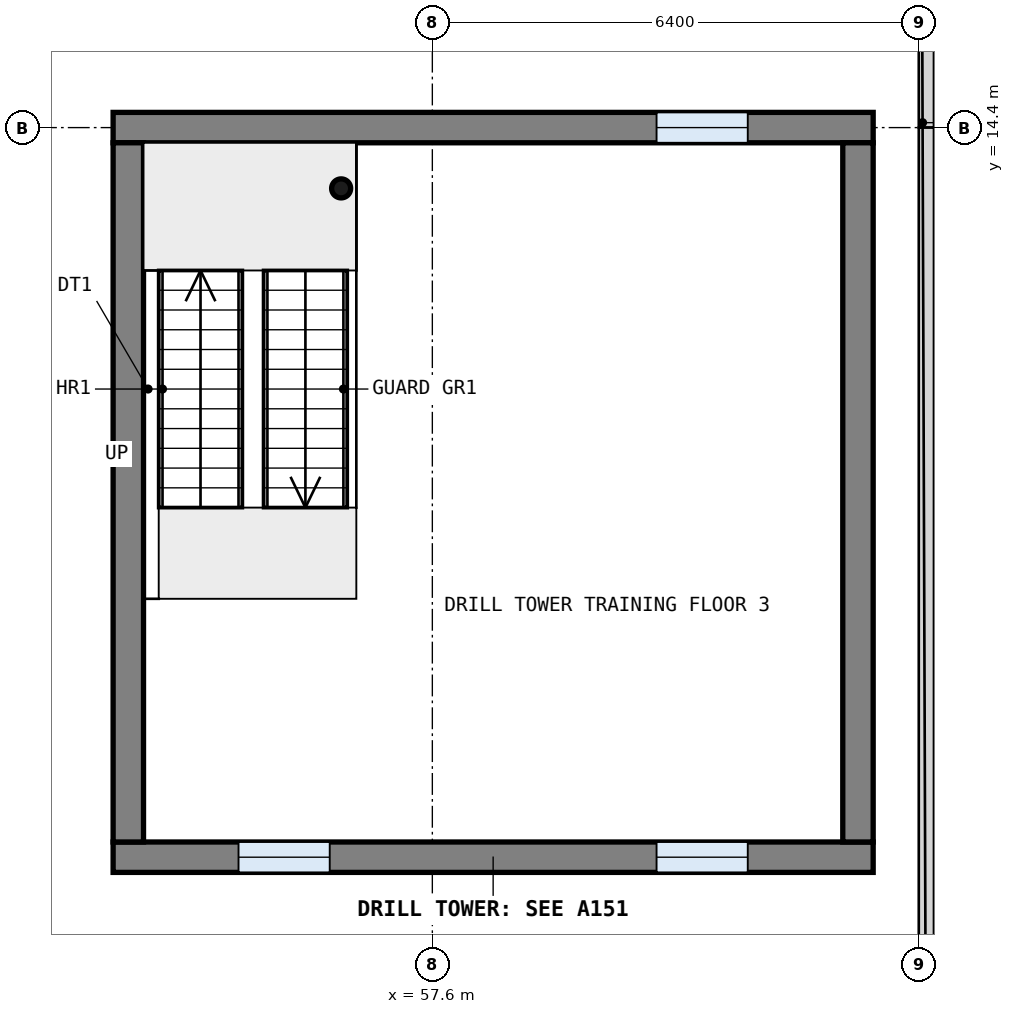
"""IFC4 building model, lengths in metres.
Left out: names, types, materials, properties, quantities, classifications, styles, units other than length and angle.
Written with IfcOpenShell. Run it as: python <this file> out.ifc"""

import sys

from ifc_helpers import new_model, si_unit, direction, frame, frame_2d, origin, origin_2d, place, context, subcontext, project, spatial, rectangle, circle, extrude, element, fill, save


model = new_model("IFC4")
c1 = context("Model", 3, precision=1e-05, world=origin(), true_north=direction((0.0, 1.0)))
c2 = subcontext(c1, "Body", "Model", "MODEL_VIEW")
j1 = project(units=[si_unit("LENGTHUNIT", "METRE"), si_unit("PLANEANGLEUNIT", "RADIAN")], contexts=[c1])
p1 = place(None, origin())
s1 = spatial("IfcSite", under=j1, at=p1, CompositionType="ELEMENT")
p2 = place(p1, origin())
s2 = spatial("IfcBuilding", under=s1, at=p2, CompositionType="ELEMENT")
p3 = place(p2, frame((0.0, 0.0, 8.4)))
s3 = spatial("IfcBuildingStorey", under=s2, at=p3, CompositionType="ELEMENT", Elevation=8.4)
p4 = place(p3, frame((53.4, 14.4, 0.0), z_axis=(0.0, 0.0, 1.0), x_axis=(1.0, 0.0, 0.0)))
e1 = element("IfcWall", 1, at=p4, inside=s3, PredefinedType="SHEAR", context=c2, shape_type="SweptSolid", body=[
    extrude(rectangle(XDim=10.0, YDim=0.4, at=frame_2d((5.0, 0.0))), origin(), (0.0, 0.0, 1.0), 4.5),
])
p5 = place(p4, frame((7.15, 0.0, 1.1)))
e2 = element("IfcOpeningElement", 2, at=p5, cuts=e1, PredefinedType="OPENING", context=c2, shape_type="SweptSolid", body=[
    extrude(rectangle(XDim=1.2, YDim=1.5, at=frame_2d((0.6, 0.75))), frame((0.0, 0.21, 0.0), z_axis=(0.0, -1.0, 0.0), x_axis=(1.0, 0.0, 0.0)), (0.0, 0.0, 1.0), 0.42),
])
p6 = place(p3, frame((53.4, 4.8, 0.0), z_axis=(0.0, 0.0, 1.0), x_axis=(1.0, 0.0, 0.0)))
e3 = element("IfcWall", 3, at=p6, inside=s3, PredefinedType="SHEAR", context=c2, shape_type="SweptSolid", body=[
    extrude(rectangle(XDim=10.0, YDim=0.4, at=frame_2d((5.0, 0.0))), origin(), (0.0, 0.0, 1.0), 4.5),
])
p7 = place(p6, frame((1.65, 0.0, 1.1)))
e4 = element("IfcOpeningElement", 4, at=p7, cuts=e3, PredefinedType="OPENING", context=c2, shape_type="SweptSolid", body=[
    extrude(rectangle(XDim=1.2, YDim=1.5, at=frame_2d((0.6, 0.75))), frame((0.0, 0.21, 0.0), z_axis=(0.0, -1.0, 0.0), x_axis=(1.0, 0.0, 0.0)), (0.0, 0.0, 1.0), 0.42),
])
p8 = place(p6, frame((7.15, 0.0, 1.1)))
e5 = element("IfcOpeningElement", 5, at=p8, cuts=e3, PredefinedType="OPENING", context=c2, shape_type="SweptSolid", body=[
    extrude(rectangle(XDim=1.2, YDim=1.5, at=frame_2d((0.6, 0.75))), frame((0.0, 0.21, 0.0), z_axis=(0.0, -1.0, 0.0), x_axis=(1.0, 0.0, 0.0)), (0.0, 0.0, 1.0), 0.42),
])
for number, where, z_axis, x_axis in (
    (6, (63.2, 5.0, 0.0), (0.0, 0.0, 1.0), (0.0, 1.0, 0.0)),
    (7, (53.6, 5.0, 0.0), (0.0, 0.0, 1.0), (0.0, 1.0, 0.0)),
):
    element("IfcWall", number, at=place(p3, frame(where, z_axis=z_axis, x_axis=x_axis)), inside=s3, PredefinedType="SHEAR", context=c2, shape_type="SweptSolid", body=[
        extrude(rectangle(XDim=9.2, YDim=0.4, at=frame_2d((4.6, 0.0))), origin(), (0.0, 0.0, 1.0), 4.5),
    ])
p9 = place(p3, frame((64.1, 28.8, 0.0), z_axis=(0.0, 0.0, 1.0), x_axis=(0.0, -1.0, 0.0)))
e8 = element("IfcWall", 8, at=p9, inside=s3, PredefinedType="PARAPET", context=c2, shape_type="SweptSolid", body=[
    extrude(rectangle(XDim=14.4, YDim=0.2, at=frame_2d((7.2, 0.0))), origin(), (0.0, 0.0, 1.0), 0.3),
])
p10 = place(p3, frame((64.1, 14.4, 0.0), z_axis=(0.0, 0.0, 1.0), x_axis=(0.0, -1.0, 0.0)))
e9 = element("IfcWall", 9, at=p10, inside=s3, PredefinedType="PARAPET", context=c2, shape_type="SweptSolid", body=[
    extrude(rectangle(XDim=14.3, YDim=0.2, at=frame_2d((7.15, 0.0))), origin(), (0.0, 0.0, 1.0), 0.3),
])
p11 = place(p3, frame((56.4, 13.6, 0.0), z_axis=(0.0, 0.0, 1.0), x_axis=(1.0, 0.0, 0.0)))
e10 = element("IfcColumn", 10, at=p11, inside=s3, PredefinedType="COLUMN", context=c2, shape_type="SweptSolid", body=[
    extrude(circle(Radius=0.125, at=origin_2d()), origin(), (0.0, 0.0, 1.0), 4.5),
])
p12 = place(p7, origin())
e11 = element("IfcWindow", 11, at=p12, inside=s3, PartitioningType="SINGLE_PANEL", PredefinedType="WINDOW", context=c2, shape_type="SweptSolid", body=[
    extrude(rectangle(XDim=1.2, YDim=1.5, at=frame_2d((0.6, 0.75))), frame((0.0, 0.03, 0.0), z_axis=(0.0, -1.0, 0.0), x_axis=(1.0, 0.0, 0.0)), (0.0, 0.0, 1.0), 0.06),
])
fill(e4, e11)
p13 = place(p8, origin())
e12 = element("IfcWindow", 12, at=p13, inside=s3, PartitioningType="SINGLE_PANEL", PredefinedType="WINDOW", context=c2, shape_type="SweptSolid", body=[
    extrude(rectangle(XDim=1.2, YDim=1.5, at=frame_2d((0.6, 0.75))), frame((0.0, 0.03, 0.0), z_axis=(0.0, -1.0, 0.0), x_axis=(1.0, 0.0, 0.0)), (0.0, 0.0, 1.0), 0.06),
])
fill(e5, e12)
p14 = place(p5, origin())
e13 = element("IfcWindow", 13, at=p14, inside=s3, PartitioningType="SINGLE_PANEL", PredefinedType="WINDOW", context=c2, shape_type="SweptSolid", body=[
    extrude(rectangle(XDim=1.2, YDim=1.5, at=frame_2d((0.6, 0.75))), frame((0.0, 0.03, 0.0), z_axis=(0.0, -1.0, 0.0), x_axis=(1.0, 0.0, 0.0)), (0.0, 0.0, 1.0), 0.06),
])
fill(e2, e13)
save(model, sys.argv[1])
